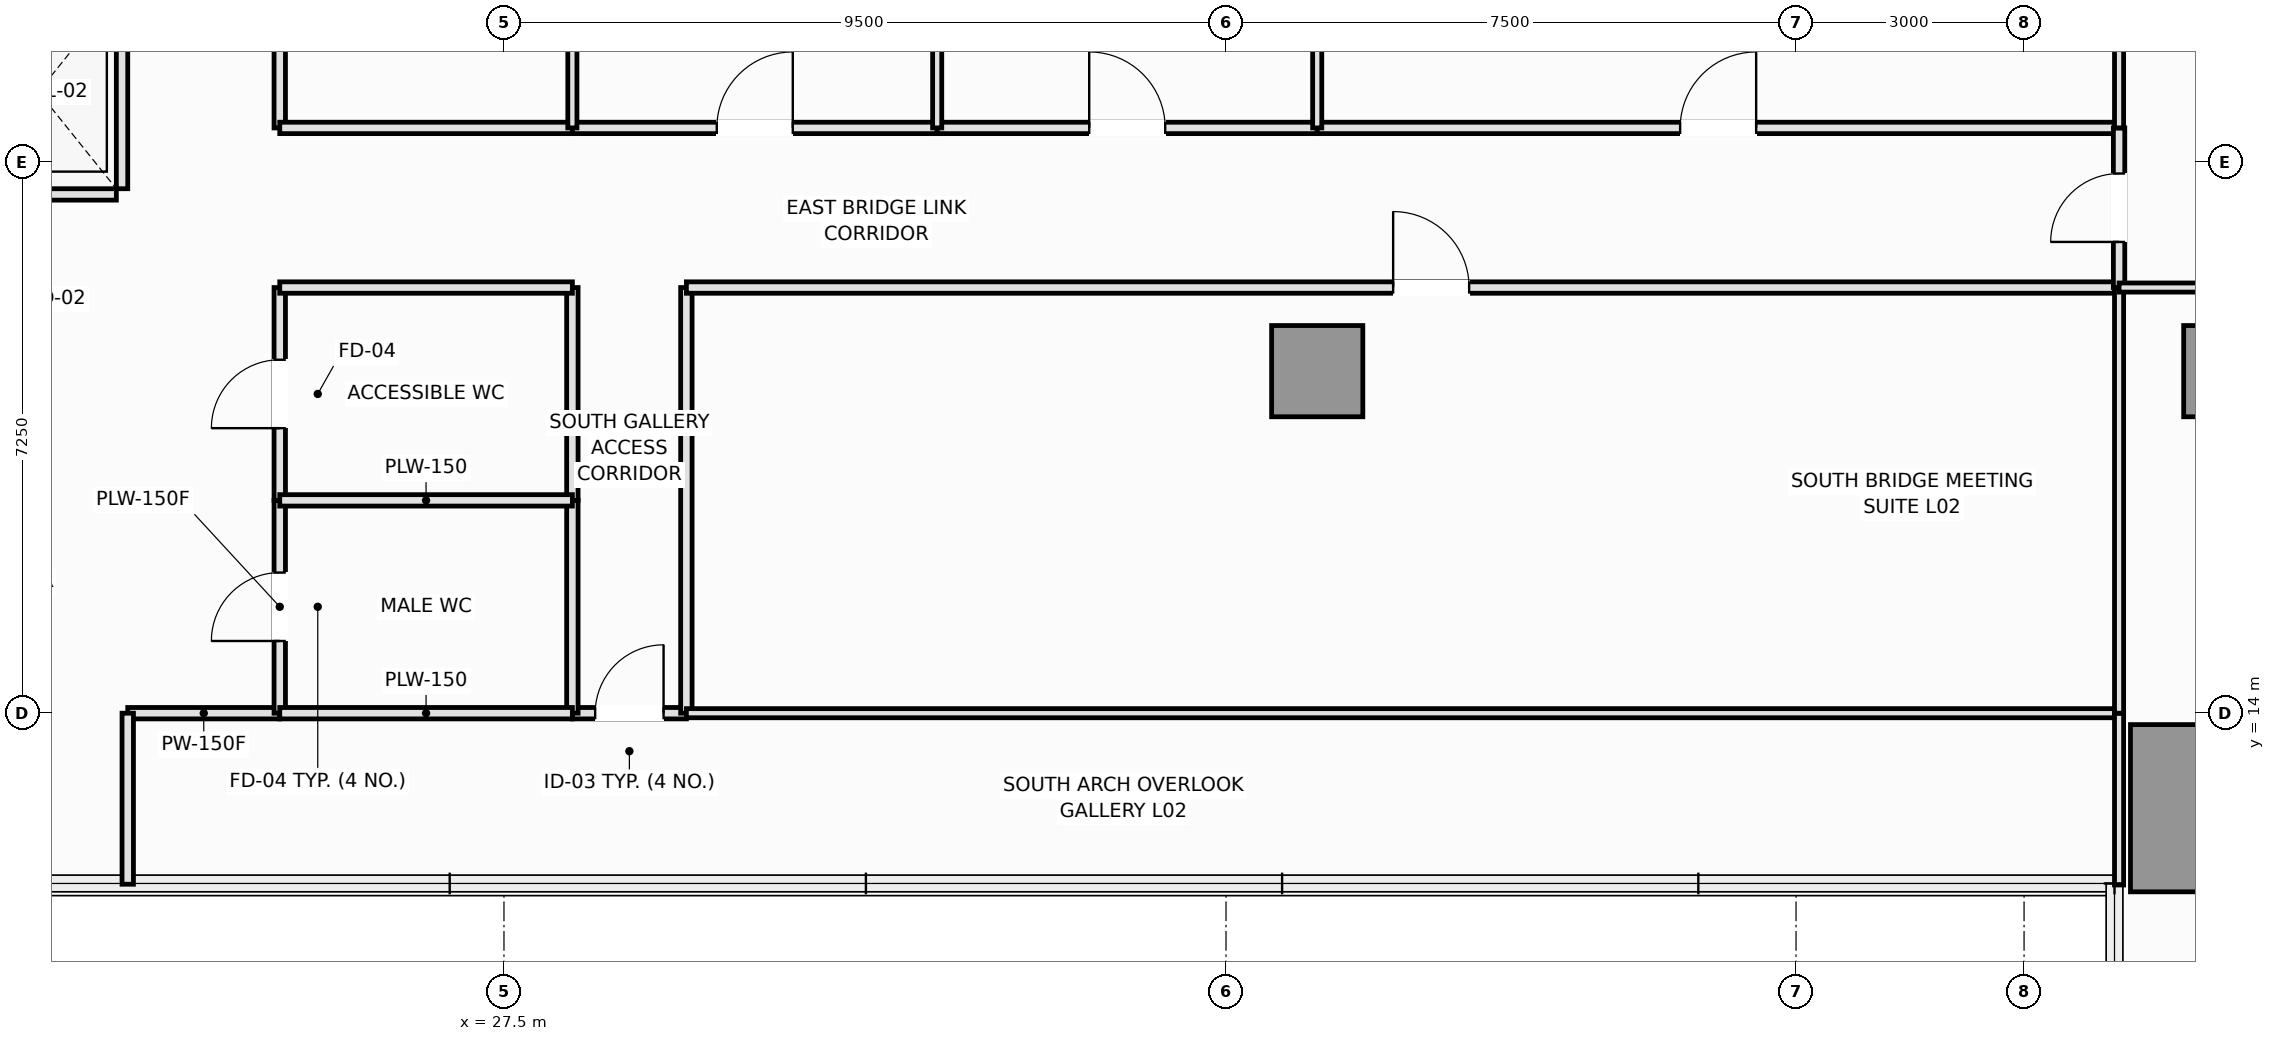
"""IFC4 building model, lengths in metres.
Left out: names, types, materials, properties, quantities, classifications, styles, units other than length and angle.
Written with IfcOpenShell. Run it as: python <this file> out.ifc"""

import sys

from ifc_helpers import new_model, si_unit, direction, frame, frame_2d, origin, origin_2d, place, context, subcontext, project, spatial, rectangle, extrude, element, fill, save


model = new_model("IFC4")
c1 = context("Model", 3, precision=1e-05, world=origin(), true_north=direction((0.0, 1.0)))
c2 = subcontext(c1, "Body", "Model", "MODEL_VIEW")
j1 = project(units=[si_unit("LENGTHUNIT", "METRE"), si_unit("PLANEANGLEUNIT", "RADIAN")], contexts=[c1])
p1 = place(None, origin())
s1 = spatial("IfcSite", under=j1, at=p1, CompositionType="ELEMENT")
p2 = place(p1, origin())
s2 = spatial("IfcBuilding", under=s1, at=p2, CompositionType="ELEMENT")
p3 = place(p2, frame((0.0, 0.0, 10.8)))
s3 = spatial("IfcBuildingStorey", under=s2, at=p3, CompositionType="ELEMENT", Elevation=10.8)
p4 = place(p3, frame((38.2, 18.5, 0.0), z_axis=(0.0, 0.0, 1.0), x_axis=(1.0, 0.0, 0.0)))
e1 = element("IfcColumn", 1, at=p4, inside=s3, PredefinedType="COLUMN", context=c2, shape_type="SweptSolid", body=[
    extrude(rectangle(XDim=1.2, YDim=1.2, at=origin_2d()), origin(), (0.0, 0.0, 1.0), 4.8),
])
p5 = place(p3, frame((50.2, 12.75, 0.0), z_axis=(0.0, 0.0, 1.0), x_axis=(1.0, 0.0, 0.0)))
e2 = element("IfcColumn", 2, at=p5, inside=s3, PredefinedType="COLUMN", context=c2, shape_type="SweptSolid", body=[
    extrude(rectangle(XDim=2.6, YDim=2.2, at=origin_2d()), origin(), (0.0, 0.0, 1.0), 4.8),
])
p6 = place(p3, frame((50.2, 18.5, 0.0), z_axis=(0.0, 0.0, 1.0), x_axis=(1.0, 0.0, 0.0)))
e3 = element("IfcColumn", 3, at=p6, inside=s3, PredefinedType="COLUMN", context=c2, shape_type="SweptSolid", body=[
    extrude(rectangle(XDim=1.2, YDim=1.2, at=origin_2d()), origin(), (0.0, 0.0, 1.0), 4.8),
])
p7 = place(p3, frame((20.35, 20.825, 0.0), z_axis=(0.0, 0.0, 1.0), x_axis=(1.0, 0.0, 0.0)))
e4 = element("IfcWall", 4, at=p7, inside=s3, PredefinedType="PARTITIONING", context=c2, shape_type="SweptSolid", body=[
    extrude(rectangle(XDim=2.05, YDim=0.15, at=frame_2d((1.025, 0.0))), origin(), (0.0, 0.0, 1.0), 4.6),
])
p8 = place(p3, frame((22.475, 20.9, 0.0), z_axis=(0.0, 0.0, 1.0), x_axis=(0.0, 1.0, 0.0)))
e5 = element("IfcWall", 5, at=p8, inside=s3, PredefinedType="PARTITIONING", context=c2, shape_type="SweptSolid", body=[
    extrude(rectangle(XDim=2.55, YDim=0.15, at=frame_2d((1.275, 0.0))), origin(), (0.0, 0.0, 1.0), 4.6),
])
p9 = place(p3, frame((22.55, 14.0, 0.0), z_axis=(0.0, 0.0, 1.0), x_axis=(1.0, 0.0, 0.0)))
e6 = element("IfcWall", 6, at=p9, inside=s3, PredefinedType="PARTITIONING", context=c2, shape_type="SweptSolid", body=[
    extrude(rectangle(XDim=2.0, YDim=0.15, at=frame_2d((1.0, 0.0))), origin(), (0.0, 0.0, 1.0), 4.6),
])
p10 = place(p3, frame((24.55, 14.0, 0.0), z_axis=(0.0, 0.0, 1.0), x_axis=(0.0, 1.0, 0.0)))
e7 = element("IfcWall", 7, at=p10, inside=s3, PredefinedType="PLUMBINGWALL", context=c2, shape_type="SweptSolid", body=[
    extrude(rectangle(XDim=2.8, YDim=0.15, at=frame_2d((1.4, 0.0))), origin(), (0.0, 0.0, 1.0), 4.6),
])
p11 = place(p10, frame((0.95, 0.0, 0.0)))
e8 = element("IfcOpeningElement", 8, at=p11, cuts=e7, PredefinedType="OPENING", context=c2, shape_type="SweptSolid", body=[
    extrude(rectangle(XDim=0.9, YDim=2.1, at=frame_2d((0.45, 1.05))), frame((0.0, 0.085, 0.0), z_axis=(0.0, -1.0, 0.0), x_axis=(1.0, 0.0, 0.0)), (0.0, 0.0, 1.0), 0.17),
])
p12 = place(p3, frame((24.55, 16.8, 0.0), z_axis=(0.0, 0.0, 1.0), x_axis=(0.0, 1.0, 0.0)))
e9 = element("IfcWall", 9, at=p12, inside=s3, PredefinedType="PLUMBINGWALL", context=c2, shape_type="SweptSolid", body=[
    extrude(rectangle(XDim=2.8, YDim=0.15, at=frame_2d((1.4, 0.0))), origin(), (0.0, 0.0, 1.0), 4.6),
])
p13 = place(p12, frame((0.95, 0.0, 0.0)))
e10 = element("IfcOpeningElement", 10, at=p13, cuts=e9, PredefinedType="OPENING", context=c2, shape_type="SweptSolid", body=[
    extrude(rectangle(XDim=0.9, YDim=2.1, at=frame_2d((0.45, 1.05))), frame((0.0, 0.085, 0.0), z_axis=(0.0, -1.0, 0.0), x_axis=(1.0, 0.0, 0.0)), (0.0, 0.0, 1.0), 0.17),
])
p14 = place(p3, frame((24.55, 21.7, 0.0), z_axis=(0.0, 0.0, 1.0), x_axis=(0.0, 1.0, 0.0)))
e11 = element("IfcWall", 11, at=p14, inside=s3, PredefinedType="PARTITIONING", context=c2, shape_type="SweptSolid", body=[
    extrude(rectangle(XDim=7.6, YDim=0.15, at=frame_2d((3.8, 0.0))), origin(), (0.0, 0.0, 1.0), 4.6),
])
p15 = place(p14, frame((3.3, 0.0, 0.0)))
e12 = element("IfcOpeningElement", 12, at=p15, cuts=e11, PredefinedType="OPENING", context=c2, shape_type="SweptSolid", body=[
    extrude(rectangle(XDim=1.0, YDim=2.15, at=frame_2d((0.5, 1.075))), frame((0.0, 0.085, 0.0), z_axis=(0.0, -1.0, 0.0), x_axis=(1.0, 0.0, 0.0)), (0.0, 0.0, 1.0), 0.17),
])
p16 = place(p3, frame((28.4, 14.0, 0.0), z_axis=(0.0, 0.0, 1.0), x_axis=(1.0, 0.0, 0.0)))
e13 = element("IfcWall", 13, at=p16, inside=s3, PredefinedType="PARTITIONING", context=c2, shape_type="SweptSolid", body=[
    extrude(rectangle(XDim=1.5, YDim=0.15, at=frame_2d((0.75, 0.0))), origin(), (0.0, 0.0, 1.0), 4.6),
])
p17 = place(p16, frame((0.3, 0.0, 0.0)))
e14 = element("IfcOpeningElement", 14, at=p17, cuts=e13, PredefinedType="OPENING", context=c2, shape_type="SweptSolid", body=[
    extrude(rectangle(XDim=0.9, YDim=2.1, at=frame_2d((0.45, 1.05))), frame((0.0, 0.085, 0.0), z_axis=(0.0, -1.0, 0.0), x_axis=(1.0, 0.0, 0.0)), (0.0, 0.0, 1.0), 0.17),
])
for number, where, z_axis, x_axis in (
    (15, (28.4, 14.0, 0.0), (0.0, 0.0, 1.0), (0.0, 1.0, 0.0)),
    (16, (28.4, 16.8, 0.0), (0.0, 0.0, 1.0), (0.0, 1.0, 0.0)),
):
    element("IfcWall", number, at=place(p3, frame(where, z_axis=z_axis, x_axis=x_axis)), inside=s3, PredefinedType="PLUMBINGWALL", context=c2, shape_type="SweptSolid", body=[
        extrude(rectangle(XDim=2.8, YDim=0.15, at=frame_2d((1.4, 0.0))), origin(), (0.0, 0.0, 1.0), 4.6),
    ])
p18 = place(p3, frame((29.9, 14.0, 0.0), z_axis=(0.0, 0.0, 1.0), x_axis=(0.0, 1.0, 0.0)))
e17 = element("IfcWall", 17, at=p18, inside=s3, PredefinedType="PARTITIONING", context=c2, shape_type="SweptSolid", body=[
    extrude(rectangle(XDim=5.6, YDim=0.15, at=frame_2d((2.8, 0.0))), origin(), (0.0, 0.0, 1.0), 4.6),
])
p19 = place(p3, frame((22.55, 11.75, 0.0), z_axis=(0.0, 0.0, 1.0), x_axis=(0.0, 1.0, 0.0)))
e18 = element("IfcWall", 18, at=p19, inside=s3, PredefinedType="PARTITIONING", context=c2, shape_type="SweptSolid", body=[
    extrude(rectangle(XDim=2.25, YDim=0.15, at=frame_2d((1.125, 0.0))), origin(), (0.0, 0.0, 1.0), 4.6),
])
p20 = place(p3, frame((24.55, 19.6, 0.0), z_axis=(0.0, 0.0, 1.0), x_axis=(1.0, 0.0, 0.0)))
e19 = element("IfcWall", 19, at=p20, inside=s3, PredefinedType="PLUMBINGWALL", context=c2, shape_type="SweptSolid", body=[
    extrude(rectangle(XDim=3.85, YDim=0.15, at=frame_2d((1.925, 0.0))), origin(), (0.0, 0.0, 1.0), 4.6),
])
p21 = place(p3, frame((29.9, 19.6, 0.0), z_axis=(0.0, 0.0, 1.0), x_axis=(1.0, 0.0, 0.0)))
e20 = element("IfcWall", 20, at=p21, inside=s3, PredefinedType="PARTITIONING", context=c2, shape_type="SweptSolid", body=[
    extrude(rectangle(XDim=18.85, YDim=0.15, at=frame_2d((9.425, 0.0))), origin(), (0.0, 0.0, 1.0), 4.6),
])
p22 = place(p21, frame((9.299, 0.0, 0.0)))
e21 = element("IfcOpeningElement", 21, at=p22, cuts=e20, PredefinedType="OPENING", context=c2, shape_type="SweptSolid", body=[
    extrude(rectangle(XDim=1.0, YDim=2.15, at=frame_2d((0.5, 1.075))), frame((0.0, 0.085, 0.0), z_axis=(0.0, -1.0, 0.0), x_axis=(1.0, 0.0, 0.0)), (0.0, 0.0, 1.0), 0.17),
])
p23 = place(p3, frame((24.55, 21.7, 0.0), z_axis=(0.0, 0.0, 1.0), x_axis=(1.0, 0.0, 0.0)))
e22 = element("IfcWall", 22, at=p23, inside=s3, PredefinedType="PARTITIONING", context=c2, shape_type="SweptSolid", body=[
    extrude(rectangle(XDim=3.85, YDim=0.15, at=frame_2d((1.925, 0.0))), origin(), (0.0, 0.0, 1.0), 4.6),
])
p24 = place(p3, frame((28.4, 21.7, 0.0), z_axis=(0.0, 0.0, 1.0), x_axis=(1.0, 0.0, 0.0)))
e23 = element("IfcWall", 23, at=p24, inside=s3, PredefinedType="PARTITIONING", context=c2, shape_type="SweptSolid", body=[
    extrude(rectangle(XDim=4.8, YDim=0.15, at=frame_2d((2.4, 0.0))), origin(), (0.0, 0.0, 1.0), 4.6),
])
p25 = place(p24, frame((1.9, 0.0, 0.0)))
e24 = element("IfcOpeningElement", 24, at=p25, cuts=e23, PredefinedType="OPENING", context=c2, shape_type="SweptSolid", body=[
    extrude(rectangle(XDim=1.0, YDim=2.15, at=frame_2d((0.5, 1.075))), frame((0.0, 0.085, 0.0), z_axis=(0.0, -1.0, 0.0), x_axis=(1.0, 0.0, 0.0)), (0.0, 0.0, 1.0), 0.17),
])
p26 = place(p3, frame((33.2, 21.7, 0.0), z_axis=(0.0, 0.0, 1.0), x_axis=(1.0, 0.0, 0.0)))
e25 = element("IfcWall", 25, at=p26, inside=s3, PredefinedType="PARTITIONING", context=c2, shape_type="SweptSolid", body=[
    extrude(rectangle(XDim=5.0, YDim=0.15, at=frame_2d((2.5, 0.0))), origin(), (0.0, 0.0, 1.0), 4.6),
])
p27 = place(p26, frame((2.0, 0.0, 0.0)))
e26 = element("IfcOpeningElement", 26, at=p27, cuts=e25, PredefinedType="OPENING", context=c2, shape_type="SweptSolid", body=[
    extrude(rectangle(XDim=1.0, YDim=2.15, at=frame_2d((0.5, 1.075))), frame((0.0, 0.085, 0.0), z_axis=(0.0, -1.0, 0.0), x_axis=(1.0, 0.0, 0.0)), (0.0, 0.0, 1.0), 0.17),
])
p28 = place(p3, frame((38.2, 21.7, 0.0), z_axis=(0.0, 0.0, 1.0), x_axis=(1.0, 0.0, 0.0)))
e27 = element("IfcWall", 27, at=p28, inside=s3, PredefinedType="PARTITIONING", context=c2, shape_type="SweptSolid", body=[
    extrude(rectangle(XDim=10.55, YDim=0.15, at=frame_2d((5.275, 0.0))), origin(), (0.0, 0.0, 1.0), 4.6),
])
p29 = place(p28, frame((4.775, 0.0, 0.0)))
e28 = element("IfcOpeningElement", 28, at=p29, cuts=e27, PredefinedType="OPENING", context=c2, shape_type="SweptSolid", body=[
    extrude(rectangle(XDim=1.0, YDim=2.15, at=frame_2d((0.5, 1.075))), frame((0.0, 0.085, 0.0), z_axis=(0.0, -1.0, 0.0), x_axis=(1.0, 0.0, 0.0)), (0.0, 0.0, 1.0), 0.17),
])
p30 = place(p3, frame((48.75, 19.6, 0.0), z_axis=(0.0, 0.0, 1.0), x_axis=(0.0, 1.0, 0.0)))
e29 = element("IfcWall", 29, at=p30, inside=s3, PredefinedType="PARTITIONING", context=c2, shape_type="SweptSolid", body=[
    extrude(rectangle(XDim=2.1, YDim=0.15, at=frame_2d((1.05, 0.0))), origin(), (0.0, 0.0, 1.0), 4.6),
])
p31 = place(p30, frame((0.6, 0.0, 0.0)))
e30 = element("IfcOpeningElement", 30, at=p31, cuts=e29, PredefinedType="OPENING", context=c2, shape_type="SweptSolid", body=[
    extrude(rectangle(XDim=0.9, YDim=2.1, at=frame_2d((0.45, 1.05))), frame((0.0, 0.085, 0.0), z_axis=(0.0, -1.0, 0.0), x_axis=(1.0, 0.0, 0.0)), (0.0, 0.0, 1.0), 0.17),
])
p32 = place(p3, frame((24.55, 14.0, 0.0), z_axis=(0.0, 0.0, 1.0), x_axis=(1.0, 0.0, 0.0)))
e31 = element("IfcWall", 31, at=p32, inside=s3, PredefinedType="PLUMBINGWALL", context=c2, shape_type="SweptSolid", body=[
    extrude(rectangle(XDim=3.85, YDim=0.15, at=frame_2d((1.925, 0.0))), origin(), (0.0, 0.0, 1.0), 4.6),
])
p33 = place(p3, frame((29.9, 14.0, 0.0), z_axis=(0.0, 0.0, 1.0), x_axis=(1.0, 0.0, 0.0)))
e32 = element("IfcWall", 32, at=p33, inside=s3, PredefinedType="PARTITIONING", context=c2, shape_type="SweptSolid", body=[
    extrude(rectangle(XDim=18.85, YDim=0.12, at=frame_2d((9.425, 0.0))), origin(), (0.0, 0.0, 1.0), 4.6),
])
p34 = place(p3, frame((48.75, 11.74, 0.0), z_axis=(0.0, 0.0, 1.0), x_axis=(0.0, 1.0, 0.0)))
e33 = element("IfcWall", 33, at=p34, inside=s3, PredefinedType="PARTITIONING", context=c2, shape_type="SweptSolid", body=[
    extrude(rectangle(XDim=2.26, YDim=0.12, at=frame_2d((1.13, 0.0))), origin(), (0.0, 0.0, 1.0), 4.0),
])
p35 = place(p3, frame((24.55, 16.8, 0.0), z_axis=(0.0, 0.0, 1.0), x_axis=(1.0, 0.0, 0.0)))
e34 = element("IfcWall", 34, at=p35, inside=s3, PredefinedType="PLUMBINGWALL", context=c2, shape_type="SweptSolid", body=[
    extrude(rectangle(XDim=3.85, YDim=0.15, at=frame_2d((1.925, 0.0))), origin(), (0.0, 0.0, 1.0), 4.6),
])
p36 = place(p3, frame((48.75, 14.0, 0.0), z_axis=(0.0, 0.0, 1.0), x_axis=(0.0, 1.0, 0.0)))
e35 = element("IfcWall", 35, at=p36, inside=s3, PredefinedType="PARTITIONING", context=c2, shape_type="SweptSolid", body=[
    extrude(rectangle(XDim=5.6, YDim=0.12, at=frame_2d((2.8, 0.0))), origin(), (0.0, 0.0, 1.0), 4.6),
])
p37 = place(p3, frame((28.4, 21.7, 0.0), z_axis=(0.0, 0.0, 1.0), x_axis=(0.0, 1.0, 0.0)))
e36 = element("IfcWall", 36, at=p37, inside=s3, PredefinedType="PARTITIONING", context=c2, shape_type="SweptSolid", body=[
    extrude(rectangle(XDim=7.6, YDim=0.12, at=frame_2d((3.8, 0.0))), origin(), (0.0, 0.0, 1.0), 4.6),
])
p38 = place(p3, frame((33.2, 21.7, 0.0), z_axis=(0.0, 0.0, 1.0), x_axis=(0.0, 1.0, 0.0)))
e37 = element("IfcWall", 37, at=p38, inside=s3, PredefinedType="PARTITIONING", context=c2, shape_type="SweptSolid", body=[
    extrude(rectangle(XDim=14.8, YDim=0.12, at=frame_2d((7.4, 0.0))), origin(), (0.0, 0.0, 1.0), 4.6),
])
p39 = place(p3, frame((38.2, 21.7, 0.0), z_axis=(0.0, 0.0, 1.0), x_axis=(0.0, 1.0, 0.0)))
e38 = element("IfcWall", 38, at=p39, inside=s3, PredefinedType="PARTITIONING", context=c2, shape_type="SweptSolid", body=[
    extrude(rectangle(XDim=14.8, YDim=0.12, at=frame_2d((7.4, 0.0))), origin(), (0.0, 0.0, 1.0), 4.0),
])
p40 = place(p3, frame((48.75, 21.7, 0.0), z_axis=(0.0, 0.0, 1.0), x_axis=(0.0, 1.0, 0.0)))
e39 = element("IfcWall", 39, at=p40, inside=s3, PredefinedType="PARTITIONING", context=c2, shape_type="SweptSolid", body=[
    extrude(rectangle(XDim=14.8, YDim=0.12, at=frame_2d((7.4, 0.0))), origin(), (0.0, 0.0, 1.0), 4.6),
])
p41 = place(p3, frame((48.75, 19.6, 0.0), z_axis=(0.0, 0.0, 1.0), x_axis=(1.0, 0.0, 0.0)))
e40 = element("IfcWall", 40, at=p41, inside=s3, PredefinedType="PARTITIONING", context=c2, shape_type="SweptSolid", body=[
    extrude(rectangle(XDim=9.05, YDim=0.12, at=frame_2d((4.525, 0.0))), origin(), (0.0, 0.0, 1.0), 4.6),
])
p42 = place(p41, frame((4.025, 0.0, 0.0)))
e41 = element("IfcOpeningElement", 41, at=p42, cuts=e40, PredefinedType="OPENING", context=c2, shape_type="SweptSolid", body=[
    extrude(rectangle(XDim=1.0, YDim=2.15, at=frame_2d((0.5, 1.075))), frame((0.0, 0.07, 0.0), z_axis=(0.0, -1.0, 0.0), x_axis=(1.0, 0.0, 0.0)), (0.0, 0.0, 1.0), 0.14),
])
p43 = place(p11, origin())
e42 = element("IfcDoor", 42, at=p43, inside=s3, OperationType="SINGLE_SWING_LEFT", PredefinedType="DOOR", context=c2, shape_type="SweptSolid", body=[
    extrude(rectangle(XDim=0.9, YDim=2.1, at=frame_2d((0.45, 1.05))), frame((0.0, 0.025, 0.0), z_axis=(0.0, -1.0, 0.0), x_axis=(1.0, 0.0, 0.0)), (0.0, 0.0, 1.0), 0.05),
])
fill(e8, e42)
p44 = place(p13, origin())
e43 = element("IfcDoor", 43, at=p44, inside=s3, OperationType="SINGLE_SWING_LEFT", PredefinedType="DOOR", context=c2, shape_type="SweptSolid", body=[
    extrude(rectangle(XDim=0.9, YDim=2.1, at=frame_2d((0.45, 1.05))), frame((0.0, 0.025, 0.0), z_axis=(0.0, -1.0, 0.0), x_axis=(1.0, 0.0, 0.0)), (0.0, 0.0, 1.0), 0.05),
])
fill(e10, e43)
p45 = place(p17, origin())
e44 = element("IfcDoor", 44, at=p45, inside=s3, OperationType="SINGLE_SWING_RIGHT", PredefinedType="DOOR", context=c2, shape_type="SweptSolid", body=[
    extrude(rectangle(XDim=0.9, YDim=2.1, at=frame_2d((0.45, 1.05))), frame((0.0, 0.025, 0.0), z_axis=(0.0, -1.0, 0.0), x_axis=(1.0, 0.0, 0.0)), (0.0, 0.0, 1.0), 0.05),
])
fill(e14, e44)
p46 = place(p22, origin())
e45 = element("IfcDoor", 45, at=p46, inside=s3, OperationType="SINGLE_SWING_LEFT", PredefinedType="DOOR", context=c2, shape_type="SweptSolid", body=[
    extrude(rectangle(XDim=1.0, YDim=2.15, at=frame_2d((0.5, 1.075))), frame((0.0, 0.025, 0.0), z_axis=(0.0, -1.0, 0.0), x_axis=(1.0, 0.0, 0.0)), (0.0, 0.0, 1.0), 0.05),
])
fill(e21, e45)
p47 = place(p25, origin())
e46 = element("IfcDoor", 46, at=p47, inside=s3, OperationType="SINGLE_SWING_RIGHT", PredefinedType="DOOR", context=c2, shape_type="SweptSolid", body=[
    extrude(rectangle(XDim=1.0, YDim=2.15, at=frame_2d((0.5, 1.075))), frame((0.0, 0.025, 0.0), z_axis=(0.0, -1.0, 0.0), x_axis=(1.0, 0.0, 0.0)), (0.0, 0.0, 1.0), 0.05),
])
fill(e24, e46)
p48 = place(p27, origin())
e47 = element("IfcDoor", 47, at=p48, inside=s3, OperationType="SINGLE_SWING_LEFT", PredefinedType="DOOR", context=c2, shape_type="SweptSolid", body=[
    extrude(rectangle(XDim=1.0, YDim=2.15, at=frame_2d((0.5, 1.075))), frame((0.0, 0.025, 0.0), z_axis=(0.0, -1.0, 0.0), x_axis=(1.0, 0.0, 0.0)), (0.0, 0.0, 1.0), 0.05),
])
fill(e26, e47)
p49 = place(p29, origin())
e48 = element("IfcDoor", 48, at=p49, inside=s3, OperationType="SINGLE_SWING_RIGHT", PredefinedType="DOOR", context=c2, shape_type="SweptSolid", body=[
    extrude(rectangle(XDim=1.0, YDim=2.15, at=frame_2d((0.5, 1.075))), frame((0.0, 0.025, 0.0), z_axis=(0.0, -1.0, 0.0), x_axis=(1.0, 0.0, 0.0)), (0.0, 0.0, 1.0), 0.05),
])
fill(e28, e48)
p50 = place(p31, origin())
e49 = element("IfcDoor", 49, at=p50, inside=s3, OperationType="SINGLE_SWING_LEFT", PredefinedType="DOOR", context=c2, shape_type="SweptSolid", body=[
    extrude(rectangle(XDim=0.9, YDim=2.1, at=frame_2d((0.45, 1.05))), frame((0.0, 0.025, 0.0), z_axis=(0.0, -1.0, 0.0), x_axis=(1.0, 0.0, 0.0)), (0.0, 0.0, 1.0), 0.05),
])
fill(e30, e49)
save(model, sys.argv[1])
